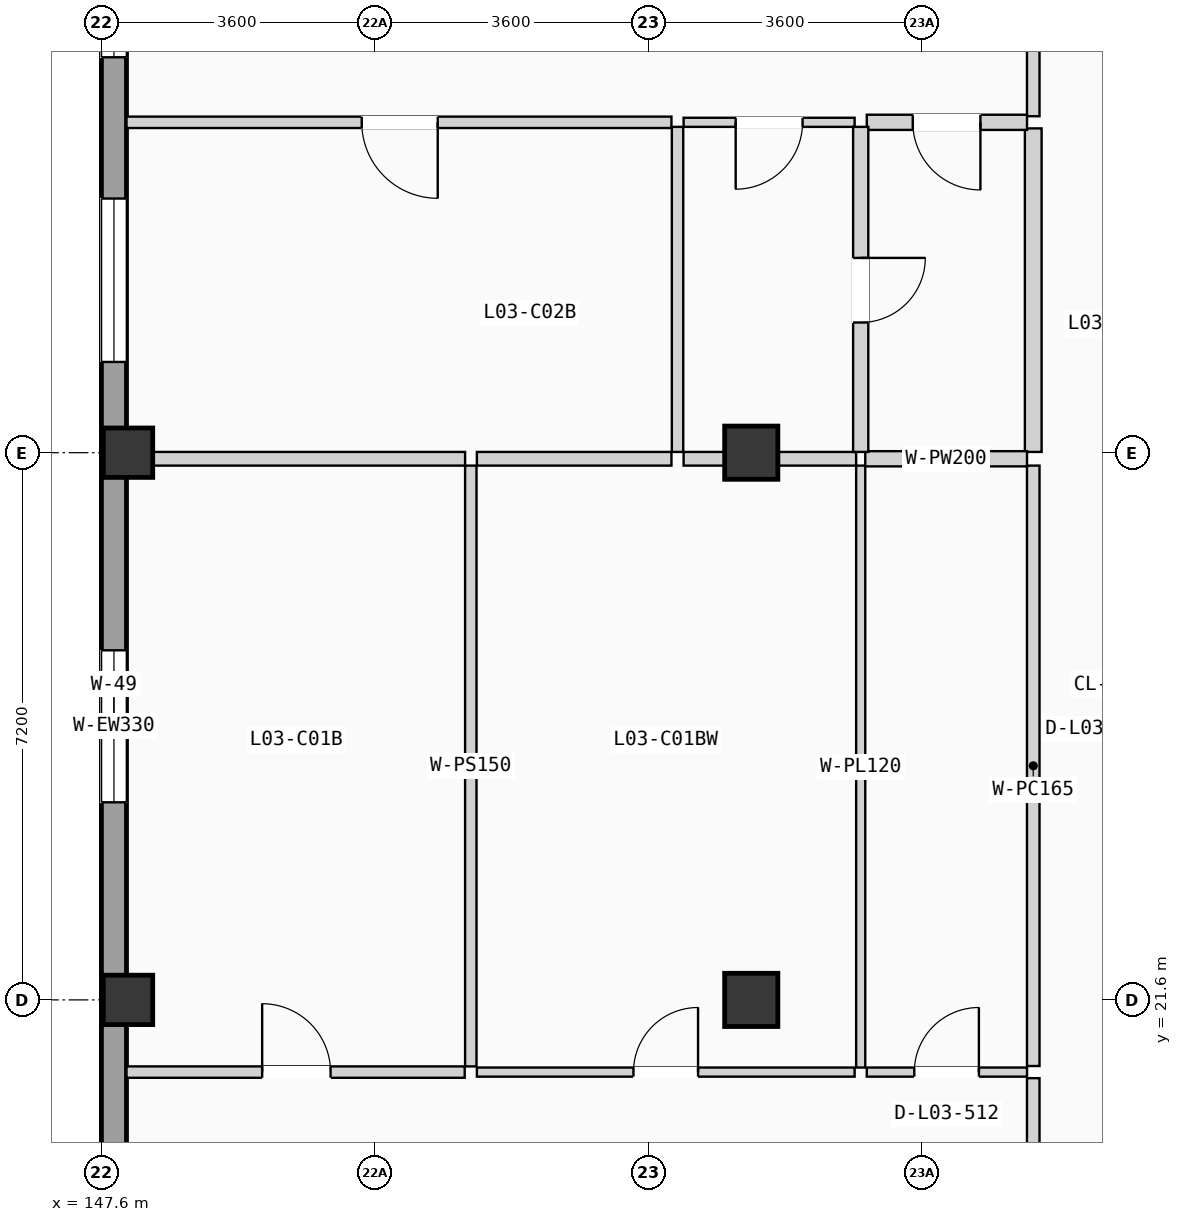
"""IFC4 building model, lengths in metres.
Left out: names, types, materials, properties, quantities, classifications, styles, units other than length and angle.
Written with IfcOpenShell. Run it as: python <this file> out.ifc"""

import sys

from ifc_helpers import new_model, si_unit, direction, frame, frame_2d, origin, origin_2d, place, context, subcontext, project, spatial, rectangle, extrude, element, fill, save


model = new_model("IFC4")
c1 = context("Model", 3, precision=1e-05, world=origin(), true_north=direction((0.0, 1.0)))
c2 = subcontext(c1, "Body", "Model", "MODEL_VIEW")
j1 = project(units=[si_unit("LENGTHUNIT", "METRE"), si_unit("PLANEANGLEUNIT", "RADIAN")], contexts=[c1])
p1 = place(None, origin())
s1 = spatial("IfcSite", under=j1, at=p1, CompositionType="ELEMENT")
p2 = place(p1, origin())
s2 = spatial("IfcBuilding", under=s1, at=p2, CompositionType="ELEMENT")
p3 = place(p2, frame((0.0, 0.0, 12.075)))
s3 = spatial("IfcBuildingStorey", under=s2, at=p3, CompositionType="ELEMENT", Elevation=12.075)
for number, where, z_axis, x_axis in (
    (1, (147.95, 21.6, 0.0), (0.0, 0.0, 1.0), (1.0, 0.0, 0.0)),
    (2, (147.95, 28.8, 0.0), (0.0, 0.0, 1.0), (1.0, 0.0, 0.0)),
):
    element("IfcColumn", number, at=place(p3, frame(where, z_axis=z_axis, x_axis=x_axis)), inside=s3, PredefinedType="COLUMN", context=c2, shape_type="SweptSolid", body=[
        extrude(rectangle(XDim=0.65, YDim=0.65, at=origin_2d()), origin(), (0.0, 0.0, 1.0), 3.15),
    ])
for number, where, z_axis, x_axis in (
    (3, (156.15, 21.6, 0.0), (0.0, 0.0, 1.0), (1.0, 0.0, 0.0)),
    (4, (156.15, 28.8, 0.0), (0.0, 0.0, 1.0), (1.0, 0.0, 0.0)),
):
    element("IfcColumn", number, at=place(p3, frame(where, z_axis=z_axis, x_axis=x_axis)), inside=s3, PredefinedType="COLUMN", context=c2, shape_type="SweptSolid", body=[
        extrude(rectangle(XDim=0.7, YDim=0.7, at=origin_2d()), origin(), (0.0, 0.0, 1.0), 3.15),
    ])
p4 = place(p3, frame((147.765, 0.33, 0.0), z_axis=(0.0, 0.0, 1.0), x_axis=(0.0, 1.0, 0.0)))
e5 = element("IfcWall", 5, at=p4, inside=s3, PredefinedType="SOLIDWALL", context=c2, shape_type="SweptSolid", body=[
    extrude(rectangle(XDim=49.74, YDim=0.33, at=frame_2d((24.87, 0.0))), origin(), (0.0, 0.0, 1.0), 2.89),
])
p5 = place(p4, frame((16.67, 0.0, 0.855)))
e6 = element("IfcOpeningElement", 6, at=p5, cuts=e5, PredefinedType="OPENING", context=c2, shape_type="SweptSolid", body=[
    extrude(rectangle(XDim=2.0, YDim=1.35, at=frame_2d((1.0, 0.675))), frame((0.0, 0.175, 0.0), z_axis=(0.0, -1.0, 0.0), x_axis=(1.0, 0.0, 0.0)), (0.0, 0.0, 1.0), 0.35),
])
p6 = place(p4, frame((9.535, 0.0, 0.705)))
e7 = element("IfcOpeningElement", 7, at=p6, cuts=e5, PredefinedType="OPENING", context=c2, shape_type="SweptSolid", body=[
    extrude(rectangle(XDim=2.0, YDim=1.5, at=frame_2d((1.0, 0.75))), frame((0.0, 0.175, 0.0), z_axis=(0.0, -1.0, 0.0), x_axis=(1.0, 0.0, 0.0)), (0.0, 0.0, 1.0), 0.35),
])
p7 = place(p4, frame((23.87, 0.0, 0.555)))
e8 = element("IfcOpeningElement", 8, at=p7, cuts=e5, PredefinedType="OPENING", context=c2, shape_type="SweptSolid", body=[
    extrude(rectangle(XDim=2.0, YDim=1.65, at=frame_2d((1.0, 0.825))), frame((0.0, 0.175, 0.0), z_axis=(0.0, -1.0, 0.0), x_axis=(1.0, 0.0, 0.0)), (0.0, 0.0, 1.0), 0.35),
])
p8 = place(p4, frame((33.673, 0.0, 0.85)))
e9 = element("IfcOpeningElement", 9, at=p8, cuts=e5, PredefinedType="OPENING", context=c2, shape_type="SweptSolid", body=[
    extrude(rectangle(XDim=0.95, YDim=1.2, at=frame_2d((0.475, 0.6))), frame((0.0, 0.175, 0.0), z_axis=(0.0, -1.0, 0.0), x_axis=(1.0, 0.0, 0.0)), (0.0, 0.0, 1.0), 0.35),
])
p9 = place(p4, frame((29.664, 0.0, 0.9)))
e10 = element("IfcOpeningElement", 10, at=p9, cuts=e5, PredefinedType="OPENING", context=c2, shape_type="SweptSolid", body=[
    extrude(rectangle(XDim=2.15, YDim=1.2, at=frame_2d((1.075, 0.6))), frame((0.0, 0.175, 0.0), z_axis=(0.0, -1.0, 0.0), x_axis=(1.0, 0.0, 0.0)), (0.0, 0.0, 1.0), 0.35),
])
p10 = place(p4, frame((39.266, 0.0, 0.855)))
e11 = element("IfcOpeningElement", 11, at=p10, cuts=e5, PredefinedType="OPENING", context=c2, shape_type="SweptSolid", body=[
    extrude(rectangle(XDim=2.15, YDim=1.35, at=frame_2d((1.075, 0.675))), frame((0.0, 0.175, 0.0), z_axis=(0.0, -1.0, 0.0), x_axis=(1.0, 0.0, 0.0)), (0.0, 0.0, 1.0), 0.35),
])
p11 = place(p3, frame((159.86, 15.43, 0.0), z_axis=(0.0, 0.0, 1.0), x_axis=(0.0, 1.0, 0.0)))
e12 = element("IfcWall", 12, at=p11, inside=s3, PredefinedType="PARTITIONING", context=c2, shape_type="SweptSolid", body=[
    extrude(rectangle(XDim=5.14, YDim=0.165, at=frame_2d((2.57, 0.0))), origin(), (0.0, 0.0, 1.0), 2.87),
])
p12 = place(p11, frame((2.045, 0.0, 0.0)))
e13 = element("IfcOpeningElement", 13, at=p12, cuts=e12, PredefinedType="OPENING", context=c2, shape_type="SweptSolid", body=[
    extrude(rectangle(XDim=1.05, YDim=2.13, at=frame_2d((0.525, 1.065))), frame((0.0, 0.093, 0.0), z_axis=(0.0, -1.0, 0.0), x_axis=(1.0, 0.0, 0.0)), (0.0, 0.0, 1.0), 0.185),
])
p13 = place(p3, frame((159.86, 20.73, 0.0), z_axis=(0.0, 0.0, 1.0), x_axis=(0.0, 1.0, 0.0)))
e14 = element("IfcWall", 14, at=p13, inside=s3, PredefinedType="PARTITIONING", context=c2, shape_type="SweptSolid", body=[
    extrude(rectangle(XDim=7.9, YDim=0.165, at=frame_2d((3.95, 0.0))), origin(), (0.0, 0.0, 1.0), 2.87),
])
p14 = place(p3, frame((159.86, 33.227, 0.0), z_axis=(0.0, 0.0, 1.0), x_axis=(0.0, 1.0, 0.0)))
e15 = element("IfcWall", 15, at=p14, inside=s3, PredefinedType="PARTITIONING", context=c2, shape_type="SweptSolid", body=[
    extrude(rectangle(XDim=5.156, YDim=0.165, at=frame_2d((2.578, 0.0))), origin(), (0.0, 0.0, 1.0), 2.87),
])
p15 = place(p14, frame((2.053, 0.0, 0.0)))
e16 = element("IfcOpeningElement", 16, at=p15, cuts=e15, PredefinedType="OPENING", context=c2, shape_type="SweptSolid", body=[
    extrude(rectangle(XDim=1.05, YDim=2.13, at=frame_2d((0.525, 1.065))), frame((0.0, 0.093, 0.0), z_axis=(0.0, -1.0, 0.0), x_axis=(1.0, 0.0, 0.0)), (0.0, 0.0, 1.0), 0.185),
])
p16 = place(p3, frame((159.86, 28.81, 0.0), z_axis=(0.0, 0.0, 1.0), x_axis=(0.0, 1.0, 0.0)))
e17 = element("IfcWall", 17, at=p16, inside=s3, PredefinedType="PLUMBINGWALL", context=c2, shape_type="SweptSolid", body=[
    extrude(rectangle(XDim=4.257, YDim=0.22, at=frame_2d((2.128, 0.0))), origin(), (0.0, 0.0, 1.0), 2.87),
])
p17 = place(p3, frame((157.67, 20.65, 0.0), z_axis=(0.0, 0.0, 1.0), x_axis=(1.0, 0.0, 0.0)))
e18 = element("IfcWall", 18, at=p17, inside=s3, PredefinedType="PARTITIONING", context=c2, shape_type="SweptSolid", body=[
    extrude(rectangle(XDim=2.108, YDim=0.12, at=frame_2d((1.054, 0.0))), origin(), (0.0, 0.0, 1.0), 2.87),
])
p18 = place(p17, frame((0.625, 0.0, 0.0)))
e19 = element("IfcOpeningElement", 19, at=p18, cuts=e18, PredefinedType="OPENING", context=c2, shape_type="SweptSolid", body=[
    extrude(rectangle(XDim=0.85, YDim=2.01, at=frame_2d((0.425, 1.005))), frame((0.0, 0.07, 0.0), z_axis=(0.0, -1.0, 0.0), x_axis=(1.0, 0.0, 0.0)), (0.0, 0.0, 1.0), 0.14),
])
p19 = place(p3, frame((147.93, 20.65, 0.0), z_axis=(0.0, 0.0, 1.0), x_axis=(1.0, 0.0, 0.0)))
e20 = element("IfcWall", 20, at=p19, inside=s3, PredefinedType="PARTITIONING", context=c2, shape_type="SweptSolid", body=[
    extrude(rectangle(XDim=4.45, YDim=0.15, at=frame_2d((2.225, 0.0))), origin(), (0.0, 0.0, 1.0), 2.87),
])
p20 = place(p19, frame((1.785, 0.0, 0.0)))
e21 = element("IfcOpeningElement", 21, at=p20, cuts=e20, PredefinedType="OPENING", context=c2, shape_type="SweptSolid", body=[
    extrude(rectangle(XDim=0.9, YDim=2.04, at=frame_2d((0.45, 1.02))), frame((0.0, 0.085, 0.0), z_axis=(0.0, -1.0, 0.0), x_axis=(1.0, 0.0, 0.0)), (0.0, 0.0, 1.0), 0.17),
])
p21 = place(p3, frame((152.54, 20.65, 0.0), z_axis=(0.0, 0.0, 1.0), x_axis=(1.0, 0.0, 0.0)))
e22 = element("IfcWall", 22, at=p21, inside=s3, PredefinedType="PARTITIONING", context=c2, shape_type="SweptSolid", body=[
    extrude(rectangle(XDim=4.97, YDim=0.12, at=frame_2d((2.485, 0.0))), origin(), (0.0, 0.0, 1.0), 2.87),
])
p22 = place(p21, frame((2.06, 0.0, 0.0)))
e23 = element("IfcOpeningElement", 23, at=p22, cuts=e22, PredefinedType="OPENING", context=c2, shape_type="SweptSolid", body=[
    extrude(rectangle(XDim=0.85, YDim=2.01, at=frame_2d((0.425, 1.005))), frame((0.0, 0.07, 0.0), z_axis=(0.0, -1.0, 0.0), x_axis=(1.0, 0.0, 0.0)), (0.0, 0.0, 1.0), 0.14),
])
p23 = place(p3, frame((157.59, 20.71, 0.0), z_axis=(0.0, 0.0, 1.0), x_axis=(0.0, 1.0, 0.0)))
e24 = element("IfcWall", 24, at=p23, inside=s3, PredefinedType="PARTITIONING", context=c2, shape_type="SweptSolid", body=[
    extrude(rectangle(XDim=7.92, YDim=0.12, at=frame_2d((3.96, 0.0))), origin(), (0.0, 0.0, 1.0), 2.87),
])
p24 = place(p3, frame((157.65, 28.72, 0.0), z_axis=(0.0, 0.0, 1.0), x_axis=(1.0, 0.0, 0.0)))
e25 = element("IfcWall", 25, at=p24, inside=s3, PredefinedType="PLUMBINGWALL", context=c2, shape_type="SweptSolid", body=[
    extrude(rectangle(XDim=2.128, YDim=0.2, at=frame_2d((1.064, 0.0))), origin(), (0.0, 0.0, 1.0), 2.16),
])
p25 = place(p3, frame((152.46, 20.725, 0.0), z_axis=(0.0, 0.0, 1.0), x_axis=(0.0, 1.0, 0.0)))
e26 = element("IfcWall", 26, at=p25, inside=s3, PredefinedType="PARTITIONING", context=c2, shape_type="SweptSolid", body=[
    extrude(rectangle(XDim=7.905, YDim=0.15, at=frame_2d((3.952, 0.0))), origin(), (0.0, 0.0, 1.0), 2.87),
])
p26 = place(p3, frame((147.93, 28.72, 0.0), z_axis=(0.0, 0.0, 1.0), x_axis=(1.0, 0.0, 0.0)))
e27 = element("IfcWall", 27, at=p26, inside=s3, PredefinedType="PARTITIONING", context=c2, shape_type="SweptSolid", body=[
    extrude(rectangle(XDim=4.455, YDim=0.18, at=frame_2d((2.228, 0.0))), origin(), (0.0, 0.0, 1.0), 2.16),
])
p27 = place(p3, frame((152.54, 28.72, 0.0), z_axis=(0.0, 0.0, 1.0), x_axis=(1.0, 0.0, 0.0)))
e28 = element("IfcWall", 28, at=p27, inside=s3, PredefinedType="PARTITIONING", context=c2, shape_type="SweptSolid", body=[
    extrude(rectangle(XDim=2.56, YDim=0.18, at=frame_2d((1.28, 0.0))), origin(), (0.0, 0.0, 1.0), 2.16),
])
p28 = place(p3, frame((155.26, 28.72, 0.0), z_axis=(0.0, 0.0, 1.0), x_axis=(1.0, 0.0, 0.0)))
e29 = element("IfcWall", 29, at=p28, inside=s3, PredefinedType="PARTITIONING", context=c2, shape_type="SweptSolid", body=[
    extrude(rectangle(XDim=2.27, YDim=0.18, at=frame_2d((1.135, 0.0))), origin(), (0.0, 0.0, 1.0), 2.16),
])
p29 = place(p3, frame((157.67, 33.147, 0.0), z_axis=(0.0, 0.0, 1.0), x_axis=(1.0, 0.0, 0.0)))
e30 = element("IfcWall", 30, at=p29, inside=s3, PredefinedType="PLUMBINGWALL", context=c2, shape_type="SweptSolid", body=[
    extrude(rectangle(XDim=2.108, YDim=0.2, at=frame_2d((1.054, 0.0))), origin(), (0.0, 0.0, 1.0), 2.87),
])
p30 = place(p29, frame((0.605, 0.0, 0.0)))
e31 = element("IfcOpeningElement", 31, at=p30, cuts=e30, PredefinedType="OPENING", context=c2, shape_type="SweptSolid", body=[
    extrude(rectangle(XDim=0.89, YDim=2.03, at=frame_2d((0.445, 1.015))), frame((0.0, 0.11, 0.0), z_axis=(0.0, -1.0, 0.0), x_axis=(1.0, 0.0, 0.0)), (0.0, 0.0, 1.0), 0.22),
])
p31 = place(p3, frame((147.93, 33.147, 0.0), z_axis=(0.0, 0.0, 1.0), x_axis=(1.0, 0.0, 0.0)))
e32 = element("IfcWall", 32, at=p31, inside=s3, PredefinedType="PARTITIONING", context=c2, shape_type="SweptSolid", body=[
    extrude(rectangle(XDim=7.17, YDim=0.15, at=frame_2d((3.585, 0.0))), origin(), (0.0, 0.0, 1.0), 2.87),
])
p32 = place(p31, frame((3.095, 0.0, 0.0)))
e33 = element("IfcOpeningElement", 33, at=p32, cuts=e32, PredefinedType="OPENING", context=c2, shape_type="SweptSolid", body=[
    extrude(rectangle(XDim=1.0, YDim=2.06, at=frame_2d((0.5, 1.03))), frame((0.0, 0.085, 0.0), z_axis=(0.0, -1.0, 0.0), x_axis=(1.0, 0.0, 0.0)), (0.0, 0.0, 1.0), 0.17),
])
p33 = place(p3, frame((155.26, 33.147, 0.0), z_axis=(0.0, 0.0, 1.0), x_axis=(1.0, 0.0, 0.0)))
e34 = element("IfcWall", 34, at=p33, inside=s3, PredefinedType="PARTITIONING", context=c2, shape_type="SweptSolid", body=[
    extrude(rectangle(XDim=2.25, YDim=0.12, at=frame_2d((1.125, 0.0))), origin(), (0.0, 0.0, 1.0), 2.87),
])
p34 = place(p33, frame((0.685, 0.0, 0.0)))
e35 = element("IfcOpeningElement", 35, at=p34, cuts=e34, PredefinedType="OPENING", context=c2, shape_type="SweptSolid", body=[
    extrude(rectangle(XDim=0.88, YDim=2.02, at=frame_2d((0.44, 1.01))), frame((0.0, 0.07, 0.0), z_axis=(0.0, -1.0, 0.0), x_axis=(1.0, 0.0, 0.0)), (0.0, 0.0, 1.0), 0.14),
])
p35 = place(p3, frame((157.59, 28.81, 0.0), z_axis=(0.0, 0.0, 1.0), x_axis=(0.0, 1.0, 0.0)))
e36 = element("IfcWall", 36, at=p35, inside=s3, PredefinedType="PLUMBINGWALL", context=c2, shape_type="SweptSolid", body=[
    extrude(rectangle(XDim=4.277, YDim=0.2, at=frame_2d((2.138, 0.0))), origin(), (0.0, 0.0, 1.0), 2.87),
])
p36 = place(p35, frame((1.703, 0.0, 0.0)))
e37 = element("IfcOpeningElement", 37, at=p36, cuts=e36, PredefinedType="OPENING", context=c2, shape_type="SweptSolid", body=[
    extrude(rectangle(XDim=0.85, YDim=2.01, at=frame_2d((0.425, 1.005))), frame((0.0, 0.11, 0.0), z_axis=(0.0, -1.0, 0.0), x_axis=(1.0, 0.0, 0.0)), (0.0, 0.0, 1.0), 0.22),
])
p37 = place(p3, frame((155.18, 28.81, 0.0), z_axis=(0.0, 0.0, 1.0), x_axis=(0.0, 1.0, 0.0)))
e38 = element("IfcWall", 38, at=p37, inside=s3, PredefinedType="PARTITIONING", context=c2, shape_type="SweptSolid", body=[
    extrude(rectangle(XDim=4.277, YDim=0.15, at=frame_2d((2.138, 0.0))), origin(), (0.0, 0.0, 1.0), 2.87),
])
p38 = place(p7, origin())
e39 = element("IfcWindow", 39, at=p38, inside=s3, PartitioningType="DOUBLE_PANEL_VERTICAL", PredefinedType="WINDOW", context=c2, shape_type="SweptSolid", body=[
    extrude(rectangle(XDim=2.0, YDim=1.65, at=frame_2d((1.0, 0.825))), frame((0.0, 0.03, 0.0), z_axis=(0.0, -1.0, 0.0), x_axis=(1.0, 0.0, 0.0)), (0.0, 0.0, 1.0), 0.06),
])
fill(e8, e39)
p39 = place(p8, origin())
e40 = element("IfcWindow", 40, at=p39, inside=s3, PartitioningType="SINGLE_PANEL", PredefinedType="WINDOW", context=c2, shape_type="SweptSolid", body=[
    extrude(rectangle(XDim=0.95, YDim=1.2, at=frame_2d((0.475, 0.6))), frame((0.0, 0.03, 0.0), z_axis=(0.0, -1.0, 0.0), x_axis=(1.0, 0.0, 0.0)), (0.0, 0.0, 1.0), 0.06),
])
fill(e9, e40)
p40 = place(p9, origin())
e41 = element("IfcWindow", 41, at=p40, inside=s3, PartitioningType="DOUBLE_PANEL_VERTICAL", PredefinedType="WINDOW", context=c2, shape_type="SweptSolid", body=[
    extrude(rectangle(XDim=2.15, YDim=1.2, at=frame_2d((1.075, 0.6))), frame((0.0, 0.03, 0.0), z_axis=(0.0, -1.0, 0.0), x_axis=(1.0, 0.0, 0.0)), (0.0, 0.0, 1.0), 0.06),
])
fill(e10, e41)
p41 = place(p18, origin())
e42 = element("IfcDoor", 42, at=p41, inside=s3, OperationType="SINGLE_SWING_RIGHT", PredefinedType="DOOR", context=c2, shape_type="SweptSolid", body=[
    extrude(rectangle(XDim=0.85, YDim=2.01, at=frame_2d((0.425, 1.005))), frame((0.0, 0.025, 0.0), z_axis=(0.0, -1.0, 0.0), x_axis=(1.0, 0.0, 0.0)), (0.0, 0.0, 1.0), 0.05),
])
fill(e19, e42)
p42 = place(p20, origin())
e43 = element("IfcDoor", 43, at=p42, inside=s3, OperationType="SINGLE_SWING_LEFT", PredefinedType="DOOR", context=c2, shape_type="SweptSolid", body=[
    extrude(rectangle(XDim=0.9, YDim=2.04, at=frame_2d((0.45, 1.02))), frame((0.0, 0.025, 0.0), z_axis=(0.0, -1.0, 0.0), x_axis=(1.0, 0.0, 0.0)), (0.0, 0.0, 1.0), 0.05),
])
fill(e21, e43)
p43 = place(p22, origin())
e44 = element("IfcDoor", 44, at=p43, inside=s3, OperationType="SINGLE_SWING_RIGHT", PredefinedType="DOOR", context=c2, shape_type="SweptSolid", body=[
    extrude(rectangle(XDim=0.85, YDim=2.01, at=frame_2d((0.425, 1.005))), frame((0.0, 0.025, 0.0), z_axis=(0.0, -1.0, 0.0), x_axis=(1.0, 0.0, 0.0)), (0.0, 0.0, 1.0), 0.05),
])
fill(e23, e44)
p44 = place(p30, frame((0.89, 0.0, 0.0), z_axis=(0.0, 0.0, 1.0), x_axis=(-1.0, 0.0, 0.0)))
e45 = element("IfcDoor", 45, at=p44, inside=s3, OperationType="SINGLE_SWING_RIGHT", PredefinedType="DOOR", context=c2, shape_type="SweptSolid", body=[
    extrude(rectangle(XDim=0.89, YDim=2.03, at=frame_2d((0.445, 1.015))), frame((0.0, 0.025, 0.0), z_axis=(0.0, -1.0, 0.0), x_axis=(1.0, 0.0, 0.0)), (0.0, 0.0, 1.0), 0.05),
])
fill(e31, e45)
p45 = place(p32, frame((1.0, 0.0, 0.0), z_axis=(0.0, 0.0, 1.0), x_axis=(-1.0, 0.0, 0.0)))
e46 = element("IfcDoor", 46, at=p45, inside=s3, OperationType="SINGLE_SWING_RIGHT", PredefinedType="DOOR", context=c2, shape_type="SweptSolid", body=[
    extrude(rectangle(XDim=1.0, YDim=2.06, at=frame_2d((0.5, 1.03))), frame((0.0, 0.025, 0.0), z_axis=(0.0, -1.0, 0.0), x_axis=(1.0, 0.0, 0.0)), (0.0, 0.0, 1.0), 0.05),
])
fill(e33, e46)
p46 = place(p34, frame((0.88, 0.0, 0.0), z_axis=(0.0, 0.0, 1.0), x_axis=(-1.0, 0.0, 0.0)))
e47 = element("IfcDoor", 47, at=p46, inside=s3, OperationType="SINGLE_SWING_LEFT", PredefinedType="DOOR", context=c2, shape_type="SweptSolid", body=[
    extrude(rectangle(XDim=0.88, YDim=2.02, at=frame_2d((0.44, 1.01))), frame((0.0, 0.025, 0.0), z_axis=(0.0, -1.0, 0.0), x_axis=(1.0, 0.0, 0.0)), (0.0, 0.0, 1.0), 0.05),
])
fill(e35, e47)
p47 = place(p36, frame((0.85, 0.0, 0.0), z_axis=(0.0, 0.0, 1.0), x_axis=(-1.0, 0.0, 0.0)))
e48 = element("IfcDoor", 48, at=p47, inside=s3, OperationType="SINGLE_SWING_RIGHT", PredefinedType="DOOR", context=c2, shape_type="SweptSolid", body=[
    extrude(rectangle(XDim=0.85, YDim=2.01, at=frame_2d((0.425, 1.005))), frame((0.0, 0.025, 0.0), z_axis=(0.0, -1.0, 0.0), x_axis=(1.0, 0.0, 0.0)), (0.0, 0.0, 1.0), 0.05),
])
fill(e37, e48)
save(model, sys.argv[1])
